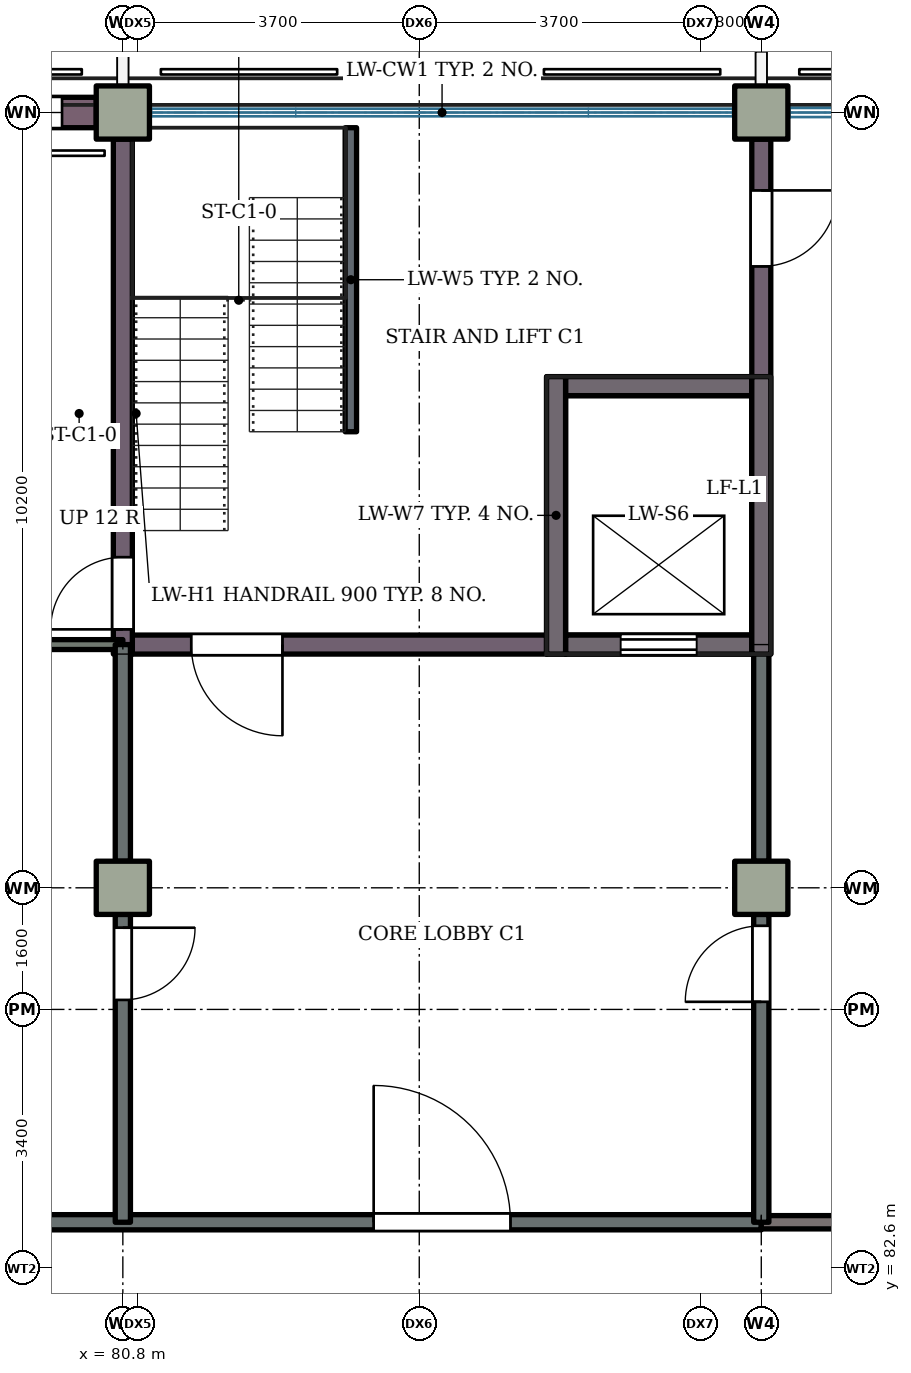
"""IFC4 building model, lengths in metres.
Left out: names, types, materials, properties, quantities, classifications, styles, units other than length and angle.
Written with IfcOpenShell. Run it as: python <this file> out.ifc"""

import sys

from ifc_helpers import new_model, si_unit, direction, frame, frame_2d, origin, origin_2d, place, context, subcontext, project, spatial, rectangle, extrude, element, fill, save


model = new_model("IFC4")
c1 = context("Model", 3, precision=1e-05, world=origin(), true_north=direction((0.0, 1.0)))
c2 = subcontext(c1, "Body", "Model", "MODEL_VIEW")
j1 = project(units=[si_unit("LENGTHUNIT", "METRE"), si_unit("PLANEANGLEUNIT", "RADIAN")], contexts=[c1])
p1 = place(None, origin())
s1 = spatial("IfcSite", under=j1, at=p1, CompositionType="ELEMENT")
p2 = place(p1, origin())
s2 = spatial("IfcBuilding", under=s1, at=p2, CompositionType="ELEMENT")
p3 = place(p2, origin())
s3 = spatial("IfcBuildingStorey", under=s2, at=p3, CompositionType="ELEMENT", Elevation=0.0)
for number, where, z_axis, x_axis in (
    (1, (80.8, 87.6, 0.0), (0.0, 0.0, 1.0), (1.0, 0.0, 0.0)),
    (2, (89.2, 87.6, 0.0), (0.0, 0.0, 1.0), (1.0, 0.0, 0.0)),
    (3, (80.8, 97.8, 0.0), (0.0, 0.0, 1.0), (1.0, 0.0, 0.0)),
    (4, (89.2, 97.8, 0.0), (0.0, 0.0, 1.0), (1.0, 0.0, 0.0)),
):
    element("IfcColumn", number, at=place(p3, frame(where, z_axis=z_axis, x_axis=x_axis)), inside=s3, PredefinedType="COLUMN", context=c2, shape_type="SweptSolid", body=[
        extrude(rectangle(XDim=0.7, YDim=0.7, at=origin_2d()), origin(), (0.0, 0.0, 1.0), 4.2),
    ])
p4 = place(p3, frame((80.925, 90.8, 0.0), z_axis=(0.0, 0.0, 1.0), x_axis=(1.0, 0.0, 0.0)))
e5 = element("IfcWall", 5, at=p4, inside=s3, PredefinedType="SHEAR", context=c2, shape_type="SweptSolid", body=[
    extrude(rectangle(XDim=5.45, YDim=0.25, at=frame_2d((2.725, 0.0))), origin(), (0.0, 0.0, 1.0), 4.2),
])
p5 = place(p4, frame((0.775, 0.0, 0.0)))
e6 = element("IfcOpeningElement", 6, at=p5, cuts=e5, PredefinedType="OPENING", context=c2, shape_type="SweptSolid", body=[
    extrude(rectangle(XDim=1.2, YDim=2.1, at=frame_2d((0.6, 1.05))), frame((0.0, 0.135, 0.0), z_axis=(0.0, -1.0, 0.0), x_axis=(1.0, 0.0, 0.0)), (0.0, 0.0, 1.0), 0.27),
])
p6 = place(p3, frame((86.625, 90.8, 0.0), z_axis=(0.0, 0.0, 1.0), x_axis=(1.0, 0.0, 0.0)))
e7 = element("IfcWall", 7, at=p6, inside=s3, PredefinedType="SHEAR", context=c2, shape_type="SweptSolid", body=[
    extrude(rectangle(XDim=2.45, YDim=0.25, at=frame_2d((1.225, 0.0))), origin(), (0.0, 0.0, 1.0), 4.2),
])
p7 = place(p6, frame((0.725, 0.0, 0.0)))
e8 = element("IfcOpeningElement", 8, at=p7, cuts=e7, PredefinedType="OPENING", context=c2, shape_type="SweptSolid", body=[
    extrude(rectangle(XDim=1.0, YDim=2.1, at=frame_2d((0.5, 1.05))), frame((0.0, 0.135, 0.0), z_axis=(0.0, -1.0, 0.0), x_axis=(1.0, 0.0, 0.0)), (0.0, 0.0, 1.0), 0.27),
])
p8 = place(p3, frame((86.625, 94.2, 0.0), z_axis=(0.0, 0.0, 1.0), x_axis=(1.0, 0.0, 0.0)))
e9 = element("IfcWall", 9, at=p8, inside=s3, PredefinedType="SHEAR", context=c2, shape_type="SweptSolid", body=[
    extrude(rectangle(XDim=2.45, YDim=0.25, at=frame_2d((1.225, 0.0))), origin(), (0.0, 0.0, 1.0), 4.2),
])
p9 = place(p3, frame((80.8, 90.675, 0.0), z_axis=(0.0, 0.0, 1.0), x_axis=(0.0, 1.0, 0.0)))
e10 = element("IfcWall", 10, at=p9, inside=s3, PredefinedType="SHEAR", context=c2, shape_type="SweptSolid", body=[
    extrude(rectangle(XDim=6.775, YDim=0.25, at=frame_2d((3.387, 0.0))), origin(), (0.0, 0.0, 1.0), 4.2),
])
p10 = place(p9, frame((0.325, 0.0, 0.0)))
e11 = element("IfcOpeningElement", 11, at=p10, cuts=e10, PredefinedType="OPENING", context=c2, shape_type="SweptSolid", body=[
    extrude(rectangle(XDim=0.95, YDim=2.1, at=frame_2d((0.475, 1.05))), frame((0.0, 0.135, 0.0), z_axis=(0.0, -1.0, 0.0), x_axis=(1.0, 0.0, 0.0)), (0.0, 0.0, 1.0), 0.27),
])
p11 = place(p3, frame((86.5, 90.675, 0.0), z_axis=(0.0, 0.0, 1.0), x_axis=(0.0, 1.0, 0.0)))
e12 = element("IfcWall", 12, at=p11, inside=s3, PredefinedType="SHEAR", context=c2, shape_type="SweptSolid", body=[
    extrude(rectangle(XDim=3.65, YDim=0.25, at=frame_2d((1.825, 0.0))), origin(), (0.0, 0.0, 1.0), 4.2),
])
p12 = place(p3, frame((89.2, 90.675, 0.0), z_axis=(0.0, 0.0, 1.0), x_axis=(0.0, 1.0, 0.0)))
e13 = element("IfcWall", 13, at=p12, inside=s3, PredefinedType="SHEAR", context=c2, shape_type="SweptSolid", body=[
    extrude(rectangle(XDim=6.775, YDim=0.25, at=frame_2d((3.387, 0.0))), origin(), (0.0, 0.0, 1.0), 4.2),
])
p13 = place(p12, frame((5.1, 0.0, 0.0)))
e14 = element("IfcOpeningElement", 14, at=p13, cuts=e13, PredefinedType="OPENING", context=c2, shape_type="SweptSolid", body=[
    extrude(rectangle(XDim=1.0, YDim=2.1, at=frame_2d((0.5, 1.05))), frame((0.0, 0.135, 0.0), z_axis=(0.0, -1.0, 0.0), x_axis=(1.0, 0.0, 0.0)), (0.0, 0.0, 1.0), 0.27),
])
p14 = place(p3, frame((72.75, 97.8, 0.0), z_axis=(0.0, 0.0, 1.0), x_axis=(1.0, 0.0, 0.0)))
e15 = element("IfcWall", 15, at=p14, inside=s3, PredefinedType="SOLIDWALL", context=c2, shape_type="SweptSolid", body=[
    extrude(rectangle(XDim=7.7, YDim=0.4, at=frame_2d((3.85, 0.0))), origin(), (0.0, 0.0, 1.0), 3.32),
])
p15 = place(p14, frame((0.55, 0.0, 1.8)))
e16 = element("IfcOpeningElement", 16, at=p15, cuts=e15, PredefinedType="OPENING", context=c2, shape_type="SweptSolid", body=[
    extrude(rectangle(XDim=1.0, YDim=1.2, at=frame_2d((0.5, 0.6))), frame((0.0, 0.21, 0.0), z_axis=(0.0, -1.0, 0.0), x_axis=(1.0, 0.0, 0.0)), (0.0, 0.0, 1.0), 0.42),
])
p16 = place(p14, frame((6.05, 0.0, 1.5)))
e17 = element("IfcOpeningElement", 17, at=p16, cuts=e15, PredefinedType="OPENING", context=c2, shape_type="SweptSolid", body=[
    extrude(rectangle(XDim=1.2, YDim=1.5, at=frame_2d((0.6, 0.75))), frame((0.0, 0.21, 0.0), z_axis=(0.0, -1.0, 0.0), x_axis=(1.0, 0.0, 0.0)), (0.0, 0.0, 1.0), 0.42),
])
p17 = place(p3, frame((64.35, 83.2, 0.0), z_axis=(0.0, 0.0, 1.0), x_axis=(1.0, 0.0, 0.0)))
e18 = element("IfcWall", 18, at=p17, inside=s3, PredefinedType="PARTITIONING", context=c2, shape_type="SweptSolid", body=[
    extrude(rectangle(XDim=24.85, YDim=0.2, at=frame_2d((12.425, 0.0))), origin(), (0.0, 0.0, 1.0), 3.92),
])
p18 = place(p17, frame((11.775, 0.0, 0.0)))
e19 = element("IfcOpeningElement", 19, at=p18, cuts=e18, PredefinedType="OPENING", context=c2, shape_type="SweptSolid", body=[
    extrude(rectangle(XDim=0.95, YDim=2.1, at=frame_2d((0.475, 1.05))), frame((0.0, 0.11, 0.0), z_axis=(0.0, -1.0, 0.0), x_axis=(1.0, 0.0, 0.0)), (0.0, 0.0, 1.0), 0.22),
])
p19 = place(p17, frame((19.75, 0.0, 0.0)))
e20 = element("IfcOpeningElement", 20, at=p19, cuts=e18, PredefinedType="OPENING", context=c2, shape_type="SweptSolid", body=[
    extrude(rectangle(XDim=1.8, YDim=2.1, at=frame_2d((0.9, 1.05))), frame((0.0, 0.11, 0.0), z_axis=(0.0, -1.0, 0.0), x_axis=(1.0, 0.0, 0.0)), (0.0, 0.0, 1.0), 0.22),
])
p20 = place(p3, frame((89.2, 83.2, 0.0), z_axis=(0.0, 0.0, 1.0), x_axis=(1.0, 0.0, 0.0)))
e21 = element("IfcWall", 21, at=p20, inside=s3, PredefinedType="PARTITIONING", context=c2, shape_type="SweptSolid", body=[
    extrude(rectangle(XDim=8.4, YDim=0.175, at=frame_2d((4.2, 0.0))), origin(), (0.0, 0.0, 1.0), 3.92),
])
p21 = place(p20, frame((3.7, 0.0, 0.0)))
e22 = element("IfcOpeningElement", 22, at=p21, cuts=e21, PredefinedType="OPENING", context=c2, shape_type="SweptSolid", body=[
    extrude(rectangle(XDim=1.0, YDim=2.1, at=frame_2d((0.5, 1.05))), frame((0.0, 0.097, 0.0), z_axis=(0.0, -1.0, 0.0), x_axis=(1.0, 0.0, 0.0)), (0.0, 0.0, 1.0), 0.195),
])
p22 = place(p3, frame((76.6, 90.8, 0.0), z_axis=(0.0, 0.0, 1.0), x_axis=(1.0, 0.0, 0.0)))
e23 = element("IfcWall", 23, at=p22, inside=s3, PredefinedType="PARTITIONING", context=c2, shape_type="SweptSolid", body=[
    extrude(rectangle(XDim=4.2, YDim=0.13, at=frame_2d((2.1, 0.0))), origin(), (0.0, 0.0, 1.0), 3.92),
])
p23 = place(p22, frame((1.625, 0.0, 0.0)))
e24 = element("IfcOpeningElement", 24, at=p23, cuts=e23, PredefinedType="OPENING", context=c2, shape_type="SweptSolid", body=[
    extrude(rectangle(XDim=0.95, YDim=2.1, at=frame_2d((0.475, 1.05))), frame((0.0, 0.075, 0.0), z_axis=(0.0, -1.0, 0.0), x_axis=(1.0, 0.0, 0.0)), (0.0, 0.0, 1.0), 0.15),
])
p24 = place(p3, frame((80.8, 83.2, 0.0), z_axis=(0.0, 0.0, 1.0), x_axis=(0.0, 1.0, 0.0)))
e25 = element("IfcWall", 25, at=p24, inside=s3, PredefinedType="PARTITIONING", context=c2, shape_type="SweptSolid", body=[
    extrude(rectangle(XDim=4.05, YDim=0.2, at=frame_2d((2.025, 0.0))), origin(), (0.0, 0.0, 1.0), 3.02),
])
p25 = place(p24, frame((2.925, 0.0, 0.0)))
e26 = element("IfcOpeningElement", 26, at=p25, cuts=e25, PredefinedType="OPENING", context=c2, shape_type="SweptSolid", body=[
    extrude(rectangle(XDim=0.95, YDim=2.1, at=frame_2d((0.475, 1.05))), frame((0.0, 0.11, 0.0), z_axis=(0.0, -1.0, 0.0), x_axis=(1.0, 0.0, 0.0)), (0.0, 0.0, 1.0), 0.22),
])
p26 = place(p3, frame((80.8, 87.95, 0.0), z_axis=(0.0, 0.0, 1.0), x_axis=(0.0, 1.0, 0.0)))
e27 = element("IfcWall", 27, at=p26, inside=s3, PredefinedType="PARTITIONING", context=c2, shape_type="SweptSolid", body=[
    extrude(rectangle(XDim=2.85, YDim=0.2, at=frame_2d((1.425, 0.0))), origin(), (0.0, 0.0, 1.0), 3.02),
])
p27 = place(p3, frame((89.2, 83.2, 0.0), z_axis=(0.0, 0.0, 1.0), x_axis=(0.0, 1.0, 0.0)))
e28 = element("IfcWall", 28, at=p27, inside=s3, PredefinedType="PARTITIONING", context=c2, shape_type="SweptSolid", body=[
    extrude(rectangle(XDim=4.05, YDim=0.2, at=frame_2d((2.025, 0.0))), origin(), (0.0, 0.0, 1.0), 3.02),
])
p28 = place(p27, frame((2.9, 0.0, 0.0)))
e29 = element("IfcOpeningElement", 29, at=p28, cuts=e28, PredefinedType="OPENING", context=c2, shape_type="SweptSolid", body=[
    extrude(rectangle(XDim=1.0, YDim=2.1, at=frame_2d((0.5, 1.05))), frame((0.0, 0.11, 0.0), z_axis=(0.0, -1.0, 0.0), x_axis=(1.0, 0.0, 0.0)), (0.0, 0.0, 1.0), 0.22),
])
p29 = place(p3, frame((89.2, 87.95, 0.0), z_axis=(0.0, 0.0, 1.0), x_axis=(0.0, 1.0, 0.0)))
e30 = element("IfcWall", 30, at=p29, inside=s3, PredefinedType="PARTITIONING", context=c2, shape_type="SweptSolid", body=[
    extrude(rectangle(XDim=2.85, YDim=0.2, at=frame_2d((1.425, 0.0))), origin(), (0.0, 0.0, 1.0), 3.02),
])
p30 = place(p3, frame((83.8, 93.6, 0.0), z_axis=(0.0, 0.0, 1.0), x_axis=(0.0, 1.0, 0.0)))
e31 = element("IfcWall", 31, at=p30, inside=s3, PredefinedType="PARTITIONING", context=c2, shape_type="SweptSolid", body=[
    extrude(rectangle(XDim=4.0, YDim=0.15, at=frame_2d((2.0, 0.0))), origin(), (0.0, 0.0, 1.0), 3.92),
])
for number, where, z_axis, x_axis in (
    (32, (86.625, 90.8, -1.2), (0.0, 0.0, 1.0), (1.0, 0.0, 0.0)),
    (33, (86.625, 94.2, -1.2), (0.0, 0.0, 1.0), (1.0, 0.0, 0.0)),
):
    element("IfcWall", number, at=place(p3, frame(where, z_axis=z_axis, x_axis=x_axis)), inside=s3, PredefinedType="SOLIDWALL", context=c2, shape_type="SweptSolid", body=[
        extrude(rectangle(XDim=2.45, YDim=0.25, at=frame_2d((1.225, 0.0))), origin(), (0.0, 0.0, 1.0), 1.2),
    ])
for number, where, z_axis, x_axis in (
    (34, (86.5, 90.675, -1.2), (0.0, 0.0, 1.0), (0.0, 1.0, 0.0)),
    (35, (89.2, 90.675, -1.2), (0.0, 0.0, 1.0), (0.0, 1.0, 0.0)),
):
    element("IfcWall", number, at=place(p3, frame(where, z_axis=z_axis, x_axis=x_axis)), inside=s3, PredefinedType="SOLIDWALL", context=c2, shape_type="SweptSolid", body=[
        extrude(rectangle(XDim=3.65, YDim=0.25, at=frame_2d((1.825, 0.0))), origin(), (0.0, 0.0, 1.0), 1.2),
    ])
p31 = place(p16, origin())
e36 = element("IfcWindow", 36, at=p31, inside=s3, PartitioningType="SINGLE_PANEL", PredefinedType="WINDOW", context=c2, shape_type="SweptSolid", body=[
    extrude(rectangle(XDim=1.2, YDim=1.5, at=frame_2d((0.6, 0.75))), frame((0.0, 0.03, 0.0), z_axis=(0.0, -1.0, 0.0), x_axis=(1.0, 0.0, 0.0)), (0.0, 0.0, 1.0), 0.06),
])
fill(e17, e36)
p32 = place(p25, origin())
e37 = element("IfcDoor", 37, at=p32, inside=s3, OperationType="SINGLE_SWING_RIGHT", PredefinedType="DOOR", context=c2, shape_type="SweptSolid", body=[
    extrude(rectangle(XDim=0.95, YDim=2.1, at=frame_2d((0.475, 1.05))), frame((0.0, 0.025, 0.0), z_axis=(0.0, -1.0, 0.0), x_axis=(1.0, 0.0, 0.0)), (0.0, 0.0, 1.0), 0.05),
])
fill(e26, e37)
p33 = place(p10, origin())
e38 = element("IfcDoor", 38, at=p33, inside=s3, OperationType="SINGLE_SWING_LEFT", PredefinedType="DOOR", context=c2, shape_type="SweptSolid", body=[
    extrude(rectangle(XDim=0.95, YDim=2.1, at=frame_2d((0.475, 1.05))), frame((0.0, 0.025, 0.0), z_axis=(0.0, -1.0, 0.0), x_axis=(1.0, 0.0, 0.0)), (0.0, 0.0, 1.0), 0.05),
])
fill(e11, e38)
p34 = place(p28, origin())
e39 = element("IfcDoor", 39, at=p34, inside=s3, OperationType="SINGLE_SWING_LEFT", PredefinedType="DOOR", context=c2, shape_type="SweptSolid", body=[
    extrude(rectangle(XDim=1.0, YDim=2.1, at=frame_2d((0.5, 1.05))), frame((0.0, 0.025, 0.0), z_axis=(0.0, -1.0, 0.0), x_axis=(1.0, 0.0, 0.0)), (0.0, 0.0, 1.0), 0.05),
])
fill(e29, e39)
p35 = place(p13, origin())
e40 = element("IfcDoor", 40, at=p35, inside=s3, OperationType="SINGLE_SWING_RIGHT", PredefinedType="DOOR", context=c2, shape_type="SweptSolid", body=[
    extrude(rectangle(XDim=1.0, YDim=2.1, at=frame_2d((0.5, 1.05))), frame((0.0, 0.025, 0.0), z_axis=(0.0, -1.0, 0.0), x_axis=(1.0, 0.0, 0.0)), (0.0, 0.0, 1.0), 0.05),
])
fill(e14, e40)
p36 = place(p19, origin())
e41 = element("IfcDoor", 41, at=p36, inside=s3, OperationType="DOUBLE_DOOR_SINGLE_SWING", PredefinedType="DOOR", context=c2, shape_type="SweptSolid", body=[
    extrude(rectangle(XDim=1.8, YDim=2.1, at=frame_2d((0.9, 1.05))), frame((0.0, 0.025, 0.0), z_axis=(0.0, -1.0, 0.0), x_axis=(1.0, 0.0, 0.0)), (0.0, 0.0, 1.0), 0.05),
])
fill(e20, e41)
p37 = place(p5, origin())
e42 = element("IfcDoor", 42, at=p37, inside=s3, OperationType="SINGLE_SWING_RIGHT", PredefinedType="DOOR", context=c2, shape_type="SweptSolid", body=[
    extrude(rectangle(XDim=1.2, YDim=2.1, at=frame_2d((0.6, 1.05))), frame((0.0, 0.025, 0.0), z_axis=(0.0, -1.0, 0.0), x_axis=(1.0, 0.0, 0.0)), (0.0, 0.0, 1.0), 0.05),
])
fill(e6, e42)
p38 = place(p7, origin())
e43 = element("IfcDoor", 43, at=p38, inside=s3, OperationType="SLIDING_TO_LEFT", PredefinedType="DOOR", context=c2, shape_type="SweptSolid", body=[
    extrude(rectangle(XDim=1.0, YDim=2.1, at=frame_2d((0.5, 1.05))), frame((0.0, 0.025, 0.0), z_axis=(0.0, -1.0, 0.0), x_axis=(1.0, 0.0, 0.0)), (0.0, 0.0, 1.0), 0.05),
])
fill(e8, e43)
save(model, sys.argv[1])
